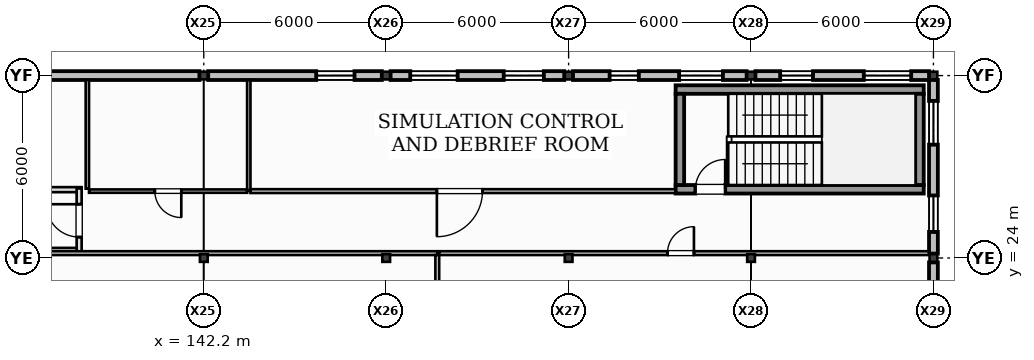
"""IFC4 building model, lengths in metres.
Left out: names, types, materials, properties, quantities, classifications, styles, units other than length and angle.
Written with IfcOpenShell. Run it as: python <this file> out.ifc"""

import sys

from ifc_helpers import new_model, si_unit, direction, frame, frame_2d, origin, origin_2d, place, context, subcontext, project, spatial, rectangle, i_section, extrude, element, fill, save


model = new_model("IFC4")
c1 = context("Model", 3, precision=1e-05, world=origin(), true_north=direction((0.0, 1.0)))
c2 = subcontext(c1, "Body", "Model", "MODEL_VIEW")
j1 = project(units=[si_unit("LENGTHUNIT", "METRE"), si_unit("PLANEANGLEUNIT", "RADIAN")], contexts=[c1])
p1 = place(None, origin())
s1 = spatial("IfcSite", under=j1, at=p1, CompositionType="ELEMENT")
p2 = place(p1, origin())
s2 = spatial("IfcBuilding", under=s1, at=p2, CompositionType="ELEMENT")
p3 = place(p2, frame((0.0, 0.0, 10.0)))
s3 = spatial("IfcBuildingStorey", under=s2, at=p3, CompositionType="ELEMENT", Elevation=10.0)
for number, where, z_axis, x_axis in (
    (1, (142.2, 24.0, 0.0), (0.0, 0.0, 1.0), (1.0, 0.0, 0.0)),
    (2, (142.2, 30.0, 0.0), (0.0, 0.0, 1.0), (1.0, 0.0, 0.0)),
    (3, (148.2, 24.0, 0.0), (0.0, 0.0, 1.0), (1.0, 0.0, 0.0)),
    (4, (148.2, 30.0, 0.0), (0.0, 0.0, 1.0), (1.0, 0.0, 0.0)),
    (5, (154.2, 24.0, 0.0), (0.0, 0.0, 1.0), (1.0, 0.0, 0.0)),
    (6, (154.2, 30.0, 0.0), (0.0, 0.0, 1.0), (1.0, 0.0, 0.0)),
    (7, (160.2, 24.0, 0.0), (0.0, 0.0, 1.0), (1.0, 0.0, 0.0)),
    (8, (160.2, 30.0, 0.0), (0.0, 0.0, 1.0), (1.0, 0.0, 0.0)),
    (9, (166.2, 24.0, 0.0), (0.0, 0.0, 1.0), (1.0, 0.0, 0.0)),
    (10, (166.2, 30.0, 0.0), (0.0, 0.0, 1.0), (1.0, 0.0, 0.0)),
):
    element("IfcColumn", number, at=place(p3, frame(where, z_axis=z_axis, x_axis=x_axis)), inside=s3, PredefinedType="COLUMN", context=c2, shape_type="SweptSolid", body=[
        extrude(i_section(OverallWidth=0.254, OverallDepth=0.253, WebThickness=0.009, FlangeThickness=0.014, at=origin_2d()), origin(), (0.0, 0.0, 1.0), 4.0),
    ])
p4 = place(p3, frame((142.055, 30.0, 0.0), z_axis=(0.0, 0.0, 1.0), x_axis=(-1.0, 0.0, 0.0)))
e11 = element("IfcWall", 11, at=p4, inside=s3, PredefinedType="STANDARD", context=c2, shape_type="SweptSolid", body=[
    extrude(rectangle(XDim=5.71, YDim=0.29, at=frame_2d((2.855, 0.0))), origin(), (0.0, 0.0, 1.0), 4.0),
])
p5 = place(p3, frame((148.055, 30.0, 0.0), z_axis=(0.0, 0.0, 1.0), x_axis=(-1.0, 0.0, 0.0)))
e12 = element("IfcWall", 12, at=p5, inside=s3, PredefinedType="STANDARD", context=c2, shape_type="SweptSolid", body=[
    extrude(rectangle(XDim=5.71, YDim=0.29, at=frame_2d((2.855, 0.0))), origin(), (0.0, 0.0, 1.0), 4.0),
])
p6 = place(p5, frame((0.897, 0.0, 1.28)))
e13 = element("IfcOpeningElement", 13, at=p6, cuts=e12, PredefinedType="OPENING", context=c2, shape_type="SweptSolid", body=[
    extrude(rectangle(XDim=1.26, YDim=1.26, at=frame_2d((0.63, 0.63))), frame((0.0, 0.155, 0.0), z_axis=(0.0, -1.0, 0.0), x_axis=(1.0, 0.0, 0.0)), (0.0, 0.0, 1.0), 0.31),
])
p7 = place(p3, frame((154.055, 30.0, 0.0), z_axis=(0.0, 0.0, 1.0), x_axis=(-1.0, 0.0, 0.0)))
e14 = element("IfcWall", 14, at=p7, inside=s3, PredefinedType="STANDARD", context=c2, shape_type="SweptSolid", body=[
    extrude(rectangle(XDim=5.71, YDim=0.29, at=frame_2d((2.855, 0.0))), origin(), (0.0, 0.0, 1.0), 4.0),
])
p8 = place(p7, frame((0.67, 0.0, 0.86)))
e15 = element("IfcOpeningElement", 15, at=p8, cuts=e14, PredefinedType="OPENING", context=c2, shape_type="SweptSolid", body=[
    extrude(rectangle(XDim=1.32, YDim=1.32, at=frame_2d((0.66, 0.66))), frame((0.0, 0.155, 0.0), z_axis=(0.0, -1.0, 0.0), x_axis=(1.0, 0.0, 0.0)), (0.0, 0.0, 1.0), 0.31),
])
p9 = place(p7, frame((3.504, 0.0, 1.42)))
e16 = element("IfcOpeningElement", 16, at=p9, cuts=e14, PredefinedType="OPENING", context=c2, shape_type="SweptSolid", body=[
    extrude(rectangle(XDim=1.56, YDim=1.56, at=frame_2d((0.78, 0.78))), frame((0.0, 0.155, 0.0), z_axis=(0.0, -1.0, 0.0), x_axis=(1.0, 0.0, 0.0)), (0.0, 0.0, 1.0), 0.31),
])
p10 = place(p3, frame((160.055, 30.0, 0.0), z_axis=(0.0, 0.0, 1.0), x_axis=(-1.0, 0.0, 0.0)))
e17 = element("IfcWall", 17, at=p10, inside=s3, PredefinedType="STANDARD", context=c2, shape_type="SweptSolid", body=[
    extrude(rectangle(XDim=5.71, YDim=0.29, at=frame_2d((2.855, 0.0))), origin(), (0.0, 0.0, 1.0), 4.0),
])
p11 = place(p10, frame((0.78, 0.0, 1.18)))
e18 = element("IfcOpeningElement", 18, at=p11, cuts=e17, PredefinedType="OPENING", context=c2, shape_type="SweptSolid", body=[
    extrude(rectangle(XDim=1.44, YDim=1.44, at=frame_2d((0.72, 0.72))), frame((0.0, 0.155, 0.0), z_axis=(0.0, -1.0, 0.0), x_axis=(1.0, 0.0, 0.0)), (0.0, 0.0, 1.0), 0.31),
])
p12 = place(p10, frame((3.546, 0.0, 0.96)))
e19 = element("IfcOpeningElement", 19, at=p12, cuts=e17, PredefinedType="OPENING", context=c2, shape_type="SweptSolid", body=[
    extrude(rectangle(XDim=0.96, YDim=0.96, at=frame_2d((0.48, 0.48))), frame((0.0, 0.155, 0.0), z_axis=(0.0, -1.0, 0.0), x_axis=(1.0, 0.0, 0.0)), (0.0, 0.0, 1.0), 0.31),
])
p13 = place(p3, frame((166.055, 30.0, 0.0), z_axis=(0.0, 0.0, 1.0), x_axis=(-1.0, 0.0, 0.0)))
e20 = element("IfcWall", 20, at=p13, inside=s3, PredefinedType="STANDARD", context=c2, shape_type="SweptSolid", body=[
    extrude(rectangle(XDim=5.71, YDim=0.29, at=frame_2d((2.855, 0.0))), origin(), (0.0, 0.0, 1.0), 4.0),
])
p14 = place(p13, frame((0.586, 0.0, 1.42)))
e21 = element("IfcOpeningElement", 21, at=p14, cuts=e20, PredefinedType="OPENING", context=c2, shape_type="SweptSolid", body=[
    extrude(rectangle(XDim=1.56, YDim=1.56, at=frame_2d((0.78, 0.78))), frame((0.0, 0.155, 0.0), z_axis=(0.0, -1.0, 0.0), x_axis=(1.0, 0.0, 0.0)), (0.0, 0.0, 1.0), 0.31),
])
p15 = place(p13, frame((3.816, 0.0, 1.28)))
e22 = element("IfcOpeningElement", 22, at=p15, cuts=e20, PredefinedType="OPENING", context=c2, shape_type="SweptSolid", body=[
    extrude(rectangle(XDim=1.08, YDim=1.08, at=frame_2d((0.54, 0.54))), frame((0.0, 0.155, 0.0), z_axis=(0.0, -1.0, 0.0), x_axis=(1.0, 0.0, 0.0)), (0.0, 0.0, 1.0), 0.31),
])
p16 = place(p3, frame((166.2, 18.145, 0.0), z_axis=(0.0, 0.0, 1.0), x_axis=(0.0, 1.0, 0.0)))
e23 = element("IfcWall", 23, at=p16, inside=s3, PredefinedType="STANDARD", context=c2, shape_type="SweptSolid", body=[
    extrude(rectangle(XDim=5.71, YDim=0.29, at=frame_2d((2.855, 0.0))), origin(), (0.0, 0.0, 1.0), 3.463),
])
p17 = place(p16, frame((1.014, 0.0, 0.86)))
e24 = element("IfcOpeningElement", 24, at=p17, cuts=e23, PredefinedType="OPENING", context=c2, shape_type="SweptSolid", body=[
    extrude(rectangle(XDim=1.08, YDim=1.08, at=frame_2d((0.54, 0.54))), frame((0.0, 0.155, 0.0), z_axis=(0.0, -1.0, 0.0), x_axis=(1.0, 0.0, 0.0)), (0.0, 0.0, 1.0), 0.31),
])
p18 = place(p16, frame((3.42, 0.0, 1.42)))
e25 = element("IfcOpeningElement", 25, at=p18, cuts=e23, PredefinedType="OPENING", context=c2, shape_type="SweptSolid", body=[
    extrude(rectangle(XDim=1.32, YDim=1.32, at=frame_2d((0.66, 0.66))), frame((0.0, 0.155, 0.0), z_axis=(0.0, -1.0, 0.0), x_axis=(1.0, 0.0, 0.0)), (0.0, 0.0, 1.0), 0.31),
])
p19 = place(p3, frame((166.2, 24.145, 0.0), z_axis=(0.0, 0.0, 1.0), x_axis=(0.0, 1.0, 0.0)))
e26 = element("IfcWall", 26, at=p19, inside=s3, PredefinedType="STANDARD", context=c2, shape_type="SweptSolid", body=[
    extrude(rectangle(XDim=5.71, YDim=0.29, at=frame_2d((2.855, 0.0))), origin(), (0.0, 0.0, 1.0), 3.463),
])
p20 = place(p19, frame((0.712, 0.0, 1.18)))
e27 = element("IfcOpeningElement", 27, at=p20, cuts=e26, PredefinedType="OPENING", context=c2, shape_type="SweptSolid", body=[
    extrude(rectangle(XDim=1.2, YDim=1.2, at=frame_2d((0.6, 0.6))), frame((0.0, 0.155, 0.0), z_axis=(0.0, -1.0, 0.0), x_axis=(1.0, 0.0, 0.0)), (0.0, 0.0, 1.0), 0.31),
])
p21 = place(p19, frame((3.582, 0.0, 0.96)))
e28 = element("IfcOpeningElement", 28, at=p21, cuts=e26, PredefinedType="OPENING", context=c2, shape_type="SweptSolid", body=[
    extrude(rectangle(XDim=1.44, YDim=1.44, at=frame_2d((0.72, 0.72))), frame((0.0, 0.155, 0.0), z_axis=(0.0, -1.0, 0.0), x_axis=(1.0, 0.0, 0.0)), (0.0, 0.0, 1.0), 0.31),
])
p22 = place(p3, frame((157.72, 26.26, 0.0), z_axis=(0.0, 0.0, 1.0), x_axis=(1.0, 0.0, 0.0)))
e29 = element("IfcWall", 29, at=p22, inside=s3, PredefinedType="SHEAR", context=c2, shape_type="SweptSolid", body=[
    extrude(rectangle(XDim=8.16, YDim=0.28, at=frame_2d((4.08, 0.0))), origin(), (0.0, 0.0, 1.0), 3.75),
])
p23 = place(p22, frame((0.65, 0.0, 0.0)))
e30 = element("IfcOpeningElement", 30, at=p23, cuts=e29, PredefinedType="OPENING", context=c2, shape_type="SweptSolid", body=[
    extrude(rectangle(XDim=0.98, YDim=2.15, at=frame_2d((0.49, 1.075))), frame((0.0, 0.15, 0.0), z_axis=(0.0, -1.0, 0.0), x_axis=(1.0, 0.0, 0.0)), (0.0, 0.0, 1.0), 0.3),
])
p24 = place(p3, frame((165.88, 29.54, 0.0), z_axis=(0.0, 0.0, 1.0), x_axis=(-1.0, 0.0, 0.0)))
e31 = element("IfcWall", 31, at=p24, inside=s3, PredefinedType="SHEAR", context=c2, shape_type="SweptSolid", body=[
    extrude(rectangle(XDim=8.16, YDim=0.28, at=frame_2d((4.08, 0.0))), origin(), (0.0, 0.0, 1.0), 3.75),
])
for number, where, z_axis, x_axis in (
    (32, (157.86, 29.4, 0.0), (0.0, 0.0, 1.0), (0.0, -1.0, 0.0)),
    (33, (165.74, 26.4, 0.0), (0.0, 0.0, 1.0), (0.0, 1.0, 0.0)),
):
    element("IfcWall", number, at=place(p3, frame(where, z_axis=z_axis, x_axis=x_axis)), inside=s3, PredefinedType="SHEAR", context=c2, shape_type="SweptSolid", body=[
        extrude(rectangle(XDim=3.0, YDim=0.28, at=frame_2d((1.5, 0.0))), origin(), (0.0, 0.0, 1.0), 3.75),
    ])
p25 = place(p3, frame((133.02, 24.25, 0.0), z_axis=(0.0, 0.0, 1.0), x_axis=(1.0, 0.0, 0.0)))
e34 = element("IfcWall", 34, at=p25, inside=s3, PredefinedType="PARTITIONING", context=c2, shape_type="SweptSolid", body=[
    extrude(rectangle(XDim=5.16, YDim=0.165, at=frame_2d((2.58, 0.0))), origin(), (0.0, 0.0, 1.0), 3.74),
])
p26 = place(p3, frame((137.065, 26.248, 0.0), z_axis=(0.0, 0.0, 1.0), x_axis=(1.0, 0.0, 0.0)))
e35 = element("IfcWall", 35, at=p26, inside=s3, PredefinedType="PARTITIONING", context=c2, shape_type="SweptSolid", body=[
    extrude(rectangle(XDim=1.115, YDim=0.165, at=frame_2d((0.558, 0.0))), origin(), (0.0, 0.0, 1.0), 3.74),
])
p27 = place(p3, frame((138.1, 24.17, 0.0), z_axis=(0.0, 0.0, 1.0), x_axis=(0.0, 1.0, 0.0)))
e36 = element("IfcWall", 36, at=p27, inside=s3, PredefinedType="PARTITIONING", context=c2, shape_type="SweptSolid", body=[
    extrude(rectangle(XDim=2.118, YDim=0.165, at=frame_2d((1.059, 0.0))), origin(), (0.0, 0.0, 1.0), 3.74),
])
p28 = place(p27, frame((0.519, 0.0, 0.0)))
e37 = element("IfcOpeningElement", 37, at=p28, cuts=e36, PredefinedType="OPENING", context=c2, shape_type="SweptSolid", body=[
    extrude(rectangle(XDim=1.08, YDim=2.14, at=frame_2d((0.54, 1.07))), frame((0.0, 0.093, 0.0), z_axis=(0.0, -1.0, 0.0), x_axis=(1.0, 0.0, 0.0)), (0.0, 0.0, 1.0), 0.185),
])
p29 = place(p3, frame((133.1, 24.16, 0.0), z_axis=(0.0, 0.0, 1.0), x_axis=(1.0, 0.0, 0.0)))
e38 = element("IfcWall", 38, at=p29, inside=s3, PredefinedType="PARTITIONING", context=c2, shape_type="SweptSolid", body=[
    extrude(rectangle(XDim=16.782, YDim=0.125, at=frame_2d((8.391, 0.0))), origin(), (0.0, 0.0, 1.0), 3.74),
])
p30 = place(p3, frame((149.88, 24.097, 0.0), z_axis=(0.0, 0.0, 1.0), x_axis=(0.0, -1.0, 0.0)))
e39 = element("IfcWall", 39, at=p30, inside=s3, PredefinedType="PARTITIONING", context=c2, shape_type="SweptSolid", body=[
    extrude(rectangle(XDim=5.952, YDim=0.125, at=frame_2d((2.976, 0.0))), origin(), (0.0, 0.0, 1.0), 3.74),
])
p31 = place(p3, frame((149.942, 24.16, 0.0), z_axis=(0.0, 0.0, 1.0), x_axis=(1.0, 0.0, 0.0)))
e40 = element("IfcWall", 40, at=p31, inside=s3, PredefinedType="PARTITIONING", context=c2, shape_type="SweptSolid", body=[
    extrude(rectangle(XDim=16.113, YDim=0.125, at=frame_2d((8.056, 0.0))), origin(), (0.0, 0.0, 1.0), 3.74),
])
p32 = place(p31, frame((7.51, 0.0, 0.0)))
e41 = element("IfcOpeningElement", 41, at=p32, cuts=e40, PredefinedType="OPENING", context=c2, shape_type="SweptSolid", body=[
    extrude(rectangle(XDim=0.87, YDim=2.06, at=frame_2d((0.435, 1.03))), frame((0.0, 0.073, 0.0), z_axis=(0.0, -1.0, 0.0), x_axis=(1.0, 0.0, 0.0)), (0.0, 0.0, 1.0), 0.145),
])
p33 = place(p3, frame((138.37, 26.28, 0.0), z_axis=(0.0, 0.0, 1.0), x_axis=(0.0, 1.0, 0.0)))
e42 = element("IfcWall", 42, at=p33, inside=s3, PredefinedType="PARTITIONING", context=c2, shape_type="SweptSolid", body=[
    extrude(rectangle(XDim=3.575, YDim=0.11, at=frame_2d((1.788, 0.0))), origin(), (0.0, 0.0, 1.0), 3.74),
])
p34 = place(p3, frame((143.68, 29.855, 0.0), z_axis=(0.0, 0.0, 1.0), x_axis=(0.0, -1.0, 0.0)))
e43 = element("IfcWall", 43, at=p34, inside=s3, PredefinedType="PARTITIONING", context=c2, shape_type="SweptSolid", body=[
    extrude(rectangle(XDim=3.65, YDim=0.11, at=frame_2d((1.825, 0.0))), origin(), (0.0, 0.0, 1.0), 3.74),
])
p35 = place(p3, frame((143.625, 26.2, 0.0), z_axis=(0.0, 0.0, 1.0), x_axis=(-1.0, 0.0, 0.0)))
e44 = element("IfcWall", 44, at=p35, inside=s3, PredefinedType="PARTITIONING", context=c2, shape_type="SweptSolid", body=[
    extrude(rectangle(XDim=5.2, YDim=0.11, at=frame_2d((2.6, 0.0))), origin(), (0.0, 0.0, 1.0), 3.74),
])
p36 = place(p35, frame((2.165, 0.0, 0.0)))
e45 = element("IfcOpeningElement", 45, at=p36, cuts=e44, PredefinedType="OPENING", context=c2, shape_type="SweptSolid", body=[
    extrude(rectangle(XDim=0.87, YDim=2.06, at=frame_2d((0.435, 1.03))), frame((0.0, 0.065, 0.0), z_axis=(0.0, -1.0, 0.0), x_axis=(1.0, 0.0, 0.0)), (0.0, 0.0, 1.0), 0.13),
])
p37 = place(p3, frame((157.72, 26.2, 0.0), z_axis=(0.0, 0.0, 1.0), x_axis=(-1.0, 0.0, 0.0)))
e46 = element("IfcWall", 46, at=p37, inside=s3, PredefinedType="PARTITIONING", context=c2, shape_type="SweptSolid", body=[
    extrude(rectangle(XDim=13.985, YDim=0.125, at=frame_2d((6.992, 0.0))), origin(), (0.0, 0.0, 1.0), 3.74),
])
p38 = place(p37, frame((6.353, 0.0, 0.0)))
e47 = element("IfcOpeningElement", 47, at=p38, cuts=e46, PredefinedType="OPENING", context=c2, shape_type="SweptSolid", body=[
    extrude(rectangle(XDim=1.5, YDim=2.22, at=frame_2d((0.75, 1.11))), frame((0.0, 0.073, 0.0), z_axis=(0.0, -1.0, 0.0), x_axis=(1.0, 0.0, 0.0)), (0.0, 0.0, 1.0), 0.145),
])
p39 = place(p6, origin())
e48 = element("IfcWindow", 48, at=p39, inside=s3, PartitioningType="SINGLE_PANEL", PredefinedType="WINDOW", context=c2, shape_type="SweptSolid", body=[
    extrude(rectangle(XDim=1.26, YDim=1.26, at=frame_2d((0.63, 0.63))), frame((0.0, 0.03, 0.0), z_axis=(0.0, -1.0, 0.0), x_axis=(1.0, 0.0, 0.0)), (0.0, 0.0, 1.0), 0.06),
])
fill(e13, e48)
p40 = place(p8, origin())
e49 = element("IfcWindow", 49, at=p40, inside=s3, PartitioningType="SINGLE_PANEL", PredefinedType="WINDOW", context=c2, shape_type="SweptSolid", body=[
    extrude(rectangle(XDim=1.32, YDim=1.32, at=frame_2d((0.66, 0.66))), frame((0.0, 0.03, 0.0), z_axis=(0.0, -1.0, 0.0), x_axis=(1.0, 0.0, 0.0)), (0.0, 0.0, 1.0), 0.06),
])
fill(e15, e49)
p41 = place(p9, origin())
e50 = element("IfcWindow", 50, at=p41, inside=s3, PartitioningType="SINGLE_PANEL", PredefinedType="WINDOW", context=c2, shape_type="SweptSolid", body=[
    extrude(rectangle(XDim=1.56, YDim=1.56, at=frame_2d((0.78, 0.78))), frame((0.0, 0.03, 0.0), z_axis=(0.0, -1.0, 0.0), x_axis=(1.0, 0.0, 0.0)), (0.0, 0.0, 1.0), 0.06),
])
fill(e16, e50)
p42 = place(p11, origin())
e51 = element("IfcWindow", 51, at=p42, inside=s3, PartitioningType="SINGLE_PANEL", PredefinedType="WINDOW", context=c2, shape_type="SweptSolid", body=[
    extrude(rectangle(XDim=1.44, YDim=1.44, at=frame_2d((0.72, 0.72))), frame((0.0, 0.03, 0.0), z_axis=(0.0, -1.0, 0.0), x_axis=(1.0, 0.0, 0.0)), (0.0, 0.0, 1.0), 0.06),
])
fill(e18, e51)
p43 = place(p12, origin())
e52 = element("IfcWindow", 52, at=p43, inside=s3, PartitioningType="SINGLE_PANEL", PredefinedType="WINDOW", context=c2, shape_type="SweptSolid", body=[
    extrude(rectangle(XDim=0.96, YDim=0.96, at=frame_2d((0.48, 0.48))), frame((0.0, 0.03, 0.0), z_axis=(0.0, -1.0, 0.0), x_axis=(1.0, 0.0, 0.0)), (0.0, 0.0, 1.0), 0.06),
])
fill(e19, e52)
p44 = place(p14, origin())
e53 = element("IfcWindow", 53, at=p44, inside=s3, PartitioningType="SINGLE_PANEL", PredefinedType="WINDOW", context=c2, shape_type="SweptSolid", body=[
    extrude(rectangle(XDim=1.56, YDim=1.56, at=frame_2d((0.78, 0.78))), frame((0.0, 0.03, 0.0), z_axis=(0.0, -1.0, 0.0), x_axis=(1.0, 0.0, 0.0)), (0.0, 0.0, 1.0), 0.06),
])
fill(e21, e53)
p45 = place(p15, origin())
e54 = element("IfcWindow", 54, at=p45, inside=s3, PartitioningType="SINGLE_PANEL", PredefinedType="WINDOW", context=c2, shape_type="SweptSolid", body=[
    extrude(rectangle(XDim=1.08, YDim=1.08, at=frame_2d((0.54, 0.54))), frame((0.0, 0.03, 0.0), z_axis=(0.0, -1.0, 0.0), x_axis=(1.0, 0.0, 0.0)), (0.0, 0.0, 1.0), 0.06),
])
fill(e22, e54)
p46 = place(p20, origin())
e55 = element("IfcWindow", 55, at=p46, inside=s3, PartitioningType="SINGLE_PANEL", PredefinedType="WINDOW", context=c2, shape_type="SweptSolid", body=[
    extrude(rectangle(XDim=1.2, YDim=1.2, at=frame_2d((0.6, 0.6))), frame((0.0, 0.03, 0.0), z_axis=(0.0, -1.0, 0.0), x_axis=(1.0, 0.0, 0.0)), (0.0, 0.0, 1.0), 0.06),
])
fill(e27, e55)
p47 = place(p21, origin())
e56 = element("IfcWindow", 56, at=p47, inside=s3, PartitioningType="SINGLE_PANEL", PredefinedType="WINDOW", context=c2, shape_type="SweptSolid", body=[
    extrude(rectangle(XDim=1.44, YDim=1.44, at=frame_2d((0.72, 0.72))), frame((0.0, 0.03, 0.0), z_axis=(0.0, -1.0, 0.0), x_axis=(1.0, 0.0, 0.0)), (0.0, 0.0, 1.0), 0.06),
])
fill(e28, e56)
p48 = place(p23, origin())
e57 = element("IfcDoor", 57, at=p48, inside=s3, OperationType="SINGLE_SWING_RIGHT", PredefinedType="DOOR", context=c2, shape_type="SweptSolid", body=[
    extrude(rectangle(XDim=0.98, YDim=2.15, at=frame_2d((0.49, 1.075))), frame((0.0, 0.025, 0.0), z_axis=(0.0, -1.0, 0.0), x_axis=(1.0, 0.0, 0.0)), (0.0, 0.0, 1.0), 0.05),
])
fill(e30, e57)
p49 = place(p28, origin())
e58 = element("IfcDoor", 58, at=p49, inside=s3, OperationType="SINGLE_SWING_RIGHT", PredefinedType="DOOR", context=c2, shape_type="SweptSolid", body=[
    extrude(rectangle(XDim=1.08, YDim=2.14, at=frame_2d((0.54, 1.07))), frame((0.0, 0.025, 0.0), z_axis=(0.0, -1.0, 0.0), x_axis=(1.0, 0.0, 0.0)), (0.0, 0.0, 1.0), 0.05),
])
fill(e37, e58)
p50 = place(p32, frame((0.87, 0.0, 0.0), z_axis=(0.0, 0.0, 1.0), x_axis=(-1.0, 0.0, 0.0)))
e59 = element("IfcDoor", 59, at=p50, inside=s3, OperationType="SINGLE_SWING_RIGHT", PredefinedType="DOOR", context=c2, shape_type="SweptSolid", body=[
    extrude(rectangle(XDim=0.87, YDim=2.06, at=frame_2d((0.435, 1.03))), frame((0.0, 0.025, 0.0), z_axis=(0.0, -1.0, 0.0), x_axis=(1.0, 0.0, 0.0)), (0.0, 0.0, 1.0), 0.05),
])
fill(e41, e59)
p51 = place(p36, frame((0.87, 0.0, 0.0), z_axis=(0.0, 0.0, 1.0), x_axis=(-1.0, 0.0, 0.0)))
e60 = element("IfcDoor", 60, at=p51, inside=s3, OperationType="SINGLE_SWING_LEFT", PredefinedType="DOOR", context=c2, shape_type="SweptSolid", body=[
    extrude(rectangle(XDim=0.87, YDim=2.06, at=frame_2d((0.435, 1.03))), frame((0.0, 0.025, 0.0), z_axis=(0.0, -1.0, 0.0), x_axis=(1.0, 0.0, 0.0)), (0.0, 0.0, 1.0), 0.05),
])
fill(e45, e60)
p52 = place(p38, frame((1.5, 0.0, 0.0), z_axis=(0.0, 0.0, 1.0), x_axis=(-1.0, 0.0, 0.0)))
e61 = element("IfcDoor", 61, at=p52, inside=s3, OperationType="SINGLE_SWING_RIGHT", PredefinedType="DOOR", context=c2, shape_type="SweptSolid", body=[
    extrude(rectangle(XDim=1.5, YDim=2.22, at=frame_2d((0.75, 1.11))), frame((0.0, 0.025, 0.0), z_axis=(0.0, -1.0, 0.0), x_axis=(1.0, 0.0, 0.0)), (0.0, 0.0, 1.0), 0.05),
])
fill(e47, e61)
save(model, sys.argv[1])
